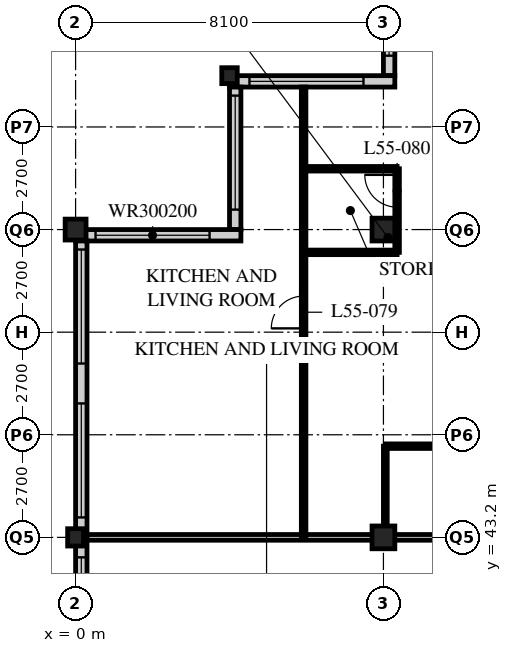
"""IFC4 building model, lengths in metres.
Left out: names, types, materials, properties, quantities, classifications, styles, units other than length and angle.
Written with IfcOpenShell. Run it as: python <this file> out.ifc"""

import sys

from ifc_helpers import new_model, si_unit, direction, frame, frame_2d, origin, origin_2d, place, context, subcontext, project, spatial, rectangle, hollow_rectangle, i_section, extrude, element, fill, save


model = new_model("IFC4")
c1 = context("Model", 3, precision=1e-05, world=origin(), true_north=direction((0.0, 1.0)))
c2 = subcontext(c1, "Body", "Model", "MODEL_VIEW")
j1 = project(units=[si_unit("LENGTHUNIT", "METRE"), si_unit("PLANEANGLEUNIT", "RADIAN")], contexts=[c1])
p1 = place(None, origin())
s1 = spatial("IfcSite", under=j1, at=p1, CompositionType="ELEMENT")
p2 = place(p1, origin())
s2 = spatial("IfcBuilding", under=s1, at=p2, CompositionType="ELEMENT")
p3 = place(p2, frame((0.0, 0.0, 213.6)))
s3 = spatial("IfcBuildingStorey", under=s2, at=p3, CompositionType="ELEMENT", Elevation=213.6)
p4 = place(p3, frame((0.0, 43.2, 0.0), z_axis=(0.0, 0.0, 1.0), x_axis=(1.0, 0.0, 0.0)))
e1 = element("IfcColumn", 1, at=p4, inside=s3, PredefinedType="COLUMN", context=c2, shape_type="SweptSolid", body=[
    extrude(i_section(OverallWidth=0.418, OverallDepth=0.456, WebThickness=0.042, FlangeThickness=0.067, FilletRadius=0.015, at=origin_2d()), origin(), (0.0, 0.0, 1.0), 3.6),
])
p5 = place(p3, frame((0.0, 51.3, 0.0), z_axis=(0.0, 0.0, 1.0), x_axis=(1.0, 0.0, 0.0)))
e2 = element("IfcColumn", 2, at=p5, inside=s3, PredefinedType="COLUMN", context=c2, shape_type="SweptSolid", body=[
    extrude(hollow_rectangle(XDim=0.55, YDim=0.55, WallThickness=0.045, at=origin_2d()), origin(), (0.0, 0.0, 1.0), 3.6),
])
p6 = place(p3, frame((4.05, 55.35, 0.0), z_axis=(0.0, 0.0, 1.0), x_axis=(1.0, 0.0, 0.0)))
e3 = element("IfcColumn", 3, at=p6, inside=s3, PredefinedType="COLUMN", context=c2, shape_type="SweptSolid", body=[
    extrude(i_section(OverallWidth=0.407, OverallDepth=0.419, WebThickness=0.031, FlangeThickness=0.049, FilletRadius=0.015, at=origin_2d()), origin(), (0.0, 0.0, 1.0), 3.6),
])
for number, where, z_axis, x_axis in (
    (4, (8.1, 43.2, 0.0), (0.0, 0.0, 1.0), (1.0, 0.0, 0.0)),
    (5, (8.1, 51.3, 0.0), (0.0, 0.0, 1.0), (1.0, 0.0, 0.0)),
):
    element("IfcColumn", number, at=place(p3, frame(where, z_axis=z_axis, x_axis=x_axis)), inside=s3, PredefinedType="COLUMN", context=c2, shape_type="SweptSolid", body=[
        extrude(hollow_rectangle(XDim=0.6, YDim=0.6, WallThickness=0.05, at=origin_2d()), origin(), (0.0, 0.0, 1.0), 3.6),
    ])
p7 = place(p3, frame((8.25, 59.1, 0.0), z_axis=(0.0, 0.0, 1.0), x_axis=(0.0, -1.0, 0.0)))
e6 = element("IfcWall", 6, at=p7, inside=s3, PredefinedType="SOLIDWALL", context=c2, shape_type="SweptSolid", body=[
    extrude(rectangle(XDim=3.75, YDim=0.3, at=frame_2d((1.875, 0.0))), origin(), (0.0, 0.0, 1.0), 3.39),
])
p8 = place(p7, frame((0.225, 0.0, 0.6)))
e7 = element("IfcOpeningElement", 7, at=p8, cuts=e6, PredefinedType="OPENING", context=c2, shape_type="SweptSolid", body=[
    extrude(rectangle(XDim=3.0, YDim=2.0, at=frame_2d((1.5, 1.0))), frame((0.0, 0.16, 0.0), z_axis=(0.0, -1.0, 0.0), x_axis=(1.0, 0.0, 0.0)), (0.0, 0.0, 1.0), 0.32),
])
p9 = place(p3, frame((8.4, 55.2, 0.0), z_axis=(0.0, 0.0, 1.0), x_axis=(-1.0, 0.0, 0.0)))
e8 = element("IfcWall", 8, at=p9, inside=s3, PredefinedType="SOLIDWALL", context=c2, shape_type="SweptSolid", body=[
    extrude(rectangle(XDim=4.35, YDim=0.3, at=frame_2d((2.175, 0.0))), origin(), (0.0, 0.0, 1.0), 3.39),
])
p10 = place(p9, frame((0.825, 0.0, 0.6)))
e9 = element("IfcOpeningElement", 9, at=p10, cuts=e8, PredefinedType="OPENING", context=c2, shape_type="SweptSolid", body=[
    extrude(rectangle(XDim=3.0, YDim=2.0, at=frame_2d((1.5, 1.0))), frame((0.0, 0.16, 0.0), z_axis=(0.0, -1.0, 0.0), x_axis=(1.0, 0.0, 0.0)), (0.0, 0.0, 1.0), 0.32),
])
p11 = place(p3, frame((4.2, 55.05, 0.0), z_axis=(0.0, 0.0, 1.0), x_axis=(0.0, -1.0, 0.0)))
e10 = element("IfcWall", 10, at=p11, inside=s3, PredefinedType="SOLIDWALL", context=c2, shape_type="SweptSolid", body=[
    extrude(rectangle(XDim=3.75, YDim=0.3, at=frame_2d((1.875, 0.0))), origin(), (0.0, 0.0, 1.0), 3.39),
])
p12 = place(p11, frame((0.225, 0.0, 0.6)))
e11 = element("IfcOpeningElement", 11, at=p12, cuts=e10, PredefinedType="OPENING", context=c2, shape_type="SweptSolid", body=[
    extrude(rectangle(XDim=3.0, YDim=2.0, at=frame_2d((1.5, 1.0))), frame((0.0, 0.16, 0.0), z_axis=(0.0, -1.0, 0.0), x_axis=(1.0, 0.0, 0.0)), (0.0, 0.0, 1.0), 0.32),
])
p13 = place(p3, frame((4.35, 51.15, 0.0), z_axis=(0.0, 0.0, 1.0), x_axis=(-1.0, 0.0, 0.0)))
e12 = element("IfcWall", 12, at=p13, inside=s3, PredefinedType="SOLIDWALL", context=c2, shape_type="SweptSolid", body=[
    extrude(rectangle(XDim=4.35, YDim=0.3, at=frame_2d((2.175, 0.0))), origin(), (0.0, 0.0, 1.0), 3.39),
])
p14 = place(p13, frame((0.825, 0.0, 0.6)))
e13 = element("IfcOpeningElement", 13, at=p14, cuts=e12, PredefinedType="OPENING", context=c2, shape_type="SweptSolid", body=[
    extrude(rectangle(XDim=3.0, YDim=2.0, at=frame_2d((1.5, 1.0))), frame((0.0, 0.16, 0.0), z_axis=(0.0, -1.0, 0.0), x_axis=(1.0, 0.0, 0.0)), (0.0, 0.0, 1.0), 0.32),
])
p15 = place(p3, frame((0.15, 51.0, 0.0), z_axis=(0.0, 0.0, 1.0), x_axis=(0.0, -1.0, 0.0)))
e14 = element("IfcWall", 14, at=p15, inside=s3, PredefinedType="SOLIDWALL", context=c2, shape_type="SweptSolid", body=[
    extrude(rectangle(XDim=32.1, YDim=0.3, at=frame_2d((16.05, 0.0))), origin(), (0.0, 0.0, 1.0), 3.39),
])
p16 = place(p15, frame((0.225, 0.0, 0.6)))
e15 = element("IfcOpeningElement", 15, at=p16, cuts=e14, PredefinedType="OPENING", context=c2, shape_type="SweptSolid", body=[
    extrude(rectangle(XDim=3.0, YDim=2.4, at=frame_2d((1.5, 1.2))), frame((0.0, 0.16, 0.0), z_axis=(0.0, -1.0, 0.0), x_axis=(1.0, 0.0, 0.0)), (0.0, 0.0, 1.0), 0.32),
])
p17 = place(p15, frame((4.275, 0.0, 0.6)))
e16 = element("IfcOpeningElement", 16, at=p17, cuts=e14, PredefinedType="OPENING", context=c2, shape_type="SweptSolid", body=[
    extrude(rectangle(XDim=3.0, YDim=2.4, at=frame_2d((1.5, 1.2))), frame((0.0, 0.16, 0.0), z_axis=(0.0, -1.0, 0.0), x_axis=(1.0, 0.0, 0.0)), (0.0, 0.0, 1.0), 0.32),
])
p18 = place(p15, frame((8.325, 0.0, 0.6)))
e17 = element("IfcOpeningElement", 17, at=p18, cuts=e14, PredefinedType="OPENING", context=c2, shape_type="SweptSolid", body=[
    extrude(rectangle(XDim=3.0, YDim=2.4, at=frame_2d((1.5, 1.2))), frame((0.0, 0.16, 0.0), z_axis=(0.0, -1.0, 0.0), x_axis=(1.0, 0.0, 0.0)), (0.0, 0.0, 1.0), 0.32),
])
p19 = place(p15, frame((12.375, 0.0, 0.6)))
e18 = element("IfcOpeningElement", 18, at=p19, cuts=e14, PredefinedType="OPENING", context=c2, shape_type="SweptSolid", body=[
    extrude(rectangle(XDim=3.0, YDim=2.4, at=frame_2d((1.5, 1.2))), frame((0.0, 0.16, 0.0), z_axis=(0.0, -1.0, 0.0), x_axis=(1.0, 0.0, 0.0)), (0.0, 0.0, 1.0), 0.32),
])
p20 = place(p15, frame((16.425, 0.0, 0.6)))
e19 = element("IfcOpeningElement", 19, at=p20, cuts=e14, PredefinedType="OPENING", context=c2, shape_type="SweptSolid", body=[
    extrude(rectangle(XDim=3.0, YDim=2.4, at=frame_2d((1.5, 1.2))), frame((0.0, 0.16, 0.0), z_axis=(0.0, -1.0, 0.0), x_axis=(1.0, 0.0, 0.0)), (0.0, 0.0, 1.0), 0.32),
])
p21 = place(p15, frame((20.475, 0.0, 0.6)))
e20 = element("IfcOpeningElement", 20, at=p21, cuts=e14, PredefinedType="OPENING", context=c2, shape_type="SweptSolid", body=[
    extrude(rectangle(XDim=3.0, YDim=2.4, at=frame_2d((1.5, 1.2))), frame((0.0, 0.16, 0.0), z_axis=(0.0, -1.0, 0.0), x_axis=(1.0, 0.0, 0.0)), (0.0, 0.0, 1.0), 0.32),
])
p22 = place(p15, frame((24.525, 0.0, 0.6)))
e21 = element("IfcOpeningElement", 21, at=p22, cuts=e14, PredefinedType="OPENING", context=c2, shape_type="SweptSolid", body=[
    extrude(rectangle(XDim=3.0, YDim=2.4, at=frame_2d((1.5, 1.2))), frame((0.0, 0.16, 0.0), z_axis=(0.0, -1.0, 0.0), x_axis=(1.0, 0.0, 0.0)), (0.0, 0.0, 1.0), 0.32),
])
p23 = place(p15, frame((28.575, 0.0, 0.6)))
e22 = element("IfcOpeningElement", 22, at=p23, cuts=e14, PredefinedType="OPENING", context=c2, shape_type="SweptSolid", body=[
    extrude(rectangle(XDim=3.0, YDim=2.4, at=frame_2d((1.5, 1.2))), frame((0.0, 0.16, 0.0), z_axis=(0.0, -1.0, 0.0), x_axis=(1.0, 0.0, 0.0)), (0.0, 0.0, 1.0), 0.32),
])
p24 = place(p3, frame((8.15, 43.2, 0.0), z_axis=(0.0, 0.0, 1.0), x_axis=(0.0, 1.0, 0.0)))
e23 = element("IfcWall", 23, at=p24, inside=s3, PredefinedType="PARTITIONING", context=c2, shape_type="SweptSolid", body=[
    extrude(rectangle(XDim=2.4, YDim=0.1, at=frame_2d((1.2, 0.0))), origin(), (0.0, 0.0, 1.0), 2.778),
])
p25 = place(p3, frame((8.15, 45.6, 0.0), z_axis=(0.0, 0.0, 1.0), x_axis=(1.0, 0.0, 0.0)))
e24 = element("IfcWall", 24, at=p25, inside=s3, PredefinedType="PARTITIONING", context=c2, shape_type="SweptSolid", body=[
    extrude(rectangle(XDim=28.3, YDim=0.12, at=frame_2d((14.15, 0.0))), origin(), (0.0, 0.0, 1.0), 3.39),
])
p26 = place(p25, frame((9.025, 0.0, 0.0)))
e25 = element("IfcOpeningElement", 25, at=p26, cuts=e24, PredefinedType="OPENING", context=c2, shape_type="SweptSolid", body=[
    extrude(rectangle(XDim=0.85, YDim=2.1, at=frame_2d((0.425, 1.05))), frame((0.0, 0.07, 0.0), z_axis=(0.0, -1.0, 0.0), x_axis=(1.0, 0.0, 0.0)), (0.0, 0.0, 1.0), 0.14),
])
p27 = place(p25, frame((16.475, 0.0, 0.0)))
e26 = element("IfcOpeningElement", 26, at=p27, cuts=e24, PredefinedType="OPENING", context=c2, shape_type="SweptSolid", body=[
    extrude(rectangle(XDim=0.85, YDim=2.1, at=frame_2d((0.425, 1.05))), frame((0.0, 0.07, 0.0), z_axis=(0.0, -1.0, 0.0), x_axis=(1.0, 0.0, 0.0)), (0.0, 0.0, 1.0), 0.14),
])
p28 = place(p25, frame((20.525, 0.0, 0.0)))
e27 = element("IfcOpeningElement", 27, at=p28, cuts=e24, PredefinedType="OPENING", context=c2, shape_type="SweptSolid", body=[
    extrude(rectangle(XDim=0.85, YDim=2.1, at=frame_2d((0.425, 1.05))), frame((0.0, 0.07, 0.0), z_axis=(0.0, -1.0, 0.0), x_axis=(1.0, 0.0, 0.0)), (0.0, 0.0, 1.0), 0.14),
])
p29 = place(p25, frame((24.575, 0.0, 0.0)))
e28 = element("IfcOpeningElement", 28, at=p29, cuts=e24, PredefinedType="OPENING", context=c2, shape_type="SweptSolid", body=[
    extrude(rectangle(XDim=0.85, YDim=2.1, at=frame_2d((0.425, 1.05))), frame((0.0, 0.07, 0.0), z_axis=(0.0, -1.0, 0.0), x_axis=(1.0, 0.0, 0.0)), (0.0, 0.0, 1.0), 0.14),
])
p30 = place(p25, frame((6.725, 0.0, 0.0)))
e29 = element("IfcOpeningElement", 29, at=p30, cuts=e24, PredefinedType="OPENING", context=c2, shape_type="SweptSolid", body=[
    extrude(rectangle(XDim=0.85, YDim=2.1, at=frame_2d((0.425, 1.05))), frame((0.0, 0.07, 0.0), z_axis=(0.0, -1.0, 0.0), x_axis=(1.0, 0.0, 0.0)), (0.0, 0.0, 1.0), 0.14),
])
p31 = place(p25, frame((2.875, 0.0, 0.0)))
e30 = element("IfcOpeningElement", 30, at=p31, cuts=e24, PredefinedType="OPENING", context=c2, shape_type="SweptSolid", body=[
    extrude(rectangle(XDim=0.85, YDim=2.1, at=frame_2d((0.425, 1.05))), frame((0.0, 0.07, 0.0), z_axis=(0.0, -1.0, 0.0), x_axis=(1.0, 0.0, 0.0)), (0.0, 0.0, 1.0), 0.14),
])
p32 = place(p3, frame((0.3, 43.2, 0.0), z_axis=(0.0, 0.0, 1.0), x_axis=(1.0, 0.0, 0.0)))
e31 = element("IfcWall", 31, at=p32, inside=s3, PredefinedType="PARTITIONING", context=c2, shape_type="SweptSolid", body=[
    extrude(rectangle(XDim=11.85, YDim=0.15, at=frame_2d((5.925, 0.0))), origin(), (0.0, 0.0, 1.0), 2.778),
])
p33 = place(p3, frame((6.0, 43.2, 0.0), z_axis=(0.0, 0.0, 1.0), x_axis=(0.0, 1.0, 0.0)))
e32 = element("IfcWall", 32, at=p33, inside=s3, PredefinedType="PARTITIONING", context=c2, shape_type="SweptSolid", body=[
    extrude(rectangle(XDim=11.85, YDim=0.12, at=frame_2d((5.925, 0.0))), origin(), (0.0, 0.0, 1.0), 3.39),
])
p34 = place(p33, frame((5.5, 0.0, 0.0)))
e33 = element("IfcOpeningElement", 33, at=p34, cuts=e32, PredefinedType="OPENING", context=c2, shape_type="SweptSolid", body=[
    extrude(rectangle(XDim=0.85, YDim=2.1, at=frame_2d((0.425, 1.05))), frame((0.0, 0.07, 0.0), z_axis=(0.0, -1.0, 0.0), x_axis=(1.0, 0.0, 0.0)), (0.0, 0.0, 1.0), 0.14),
])
for number, where, z_axis, x_axis in (
    (34, (6.0, 50.7, 0.0), (0.0, 0.0, 1.0), (1.0, 0.0, 0.0)),
    (35, (6.0, 52.9, 0.0), (0.0, 0.0, 1.0), (1.0, 0.0, 0.0)),
):
    element("IfcWall", number, at=place(p3, frame(where, z_axis=z_axis, x_axis=x_axis)), inside=s3, PredefinedType="PARTITIONING", context=c2, shape_type="SweptSolid", body=[
        extrude(rectangle(XDim=2.46, YDim=0.12, at=frame_2d((1.23, 0.0))), origin(), (0.0, 0.0, 1.0), 3.39),
    ])
p35 = place(p3, frame((8.46, 50.7, 0.0), z_axis=(0.0, 0.0, 1.0), x_axis=(0.0, 1.0, 0.0)))
e36 = element("IfcWall", 36, at=p35, inside=s3, PredefinedType="PARTITIONING", context=c2, shape_type="SweptSolid", body=[
    extrude(rectangle(XDim=2.2, YDim=0.12, at=frame_2d((1.1, 0.0))), origin(), (0.0, 0.0, 1.0), 3.39),
])
p36 = place(p35, frame((1.19, 0.0, 0.0)))
e37 = element("IfcOpeningElement", 37, at=p36, cuts=e36, PredefinedType="OPENING", context=c2, shape_type="SweptSolid", body=[
    extrude(rectangle(XDim=0.85, YDim=2.1, at=frame_2d((0.425, 1.05))), frame((0.0, 0.07, 0.0), z_axis=(0.0, -1.0, 0.0), x_axis=(1.0, 0.0, 0.0)), (0.0, 0.0, 1.0), 0.14),
])
p37 = place(p8, origin())
e38 = element("IfcWindow", 38, at=p37, inside=s3, PartitioningType="SINGLE_PANEL", PredefinedType="WINDOW", context=c2, shape_type="SweptSolid", body=[
    extrude(rectangle(XDim=3.0, YDim=2.0, at=frame_2d((1.5, 1.0))), frame((0.0, 0.03, 0.0), z_axis=(0.0, -1.0, 0.0), x_axis=(1.0, 0.0, 0.0)), (0.0, 0.0, 1.0), 0.06),
])
fill(e7, e38)
p38 = place(p10, origin())
e39 = element("IfcWindow", 39, at=p38, inside=s3, PartitioningType="SINGLE_PANEL", PredefinedType="WINDOW", context=c2, shape_type="SweptSolid", body=[
    extrude(rectangle(XDim=3.0, YDim=2.0, at=frame_2d((1.5, 1.0))), frame((0.0, 0.03, 0.0), z_axis=(0.0, -1.0, 0.0), x_axis=(1.0, 0.0, 0.0)), (0.0, 0.0, 1.0), 0.06),
])
fill(e9, e39)
p39 = place(p12, origin())
e40 = element("IfcWindow", 40, at=p39, inside=s3, PartitioningType="SINGLE_PANEL", PredefinedType="WINDOW", context=c2, shape_type="SweptSolid", body=[
    extrude(rectangle(XDim=3.0, YDim=2.0, at=frame_2d((1.5, 1.0))), frame((0.0, 0.03, 0.0), z_axis=(0.0, -1.0, 0.0), x_axis=(1.0, 0.0, 0.0)), (0.0, 0.0, 1.0), 0.06),
])
fill(e11, e40)
p40 = place(p14, origin())
e41 = element("IfcWindow", 41, at=p40, inside=s3, PartitioningType="SINGLE_PANEL", PredefinedType="WINDOW", context=c2, shape_type="SweptSolid", body=[
    extrude(rectangle(XDim=3.0, YDim=2.0, at=frame_2d((1.5, 1.0))), frame((0.0, 0.03, 0.0), z_axis=(0.0, -1.0, 0.0), x_axis=(1.0, 0.0, 0.0)), (0.0, 0.0, 1.0), 0.06),
])
fill(e13, e41)
p41 = place(p16, origin())
e42 = element("IfcWindow", 42, at=p41, inside=s3, PartitioningType="SINGLE_PANEL", PredefinedType="WINDOW", context=c2, shape_type="SweptSolid", body=[
    extrude(rectangle(XDim=3.0, YDim=2.4, at=frame_2d((1.5, 1.2))), frame((0.0, 0.03, 0.0), z_axis=(0.0, -1.0, 0.0), x_axis=(1.0, 0.0, 0.0)), (0.0, 0.0, 1.0), 0.06),
])
fill(e15, e42)
p42 = place(p17, origin())
e43 = element("IfcWindow", 43, at=p42, inside=s3, PartitioningType="SINGLE_PANEL", PredefinedType="WINDOW", context=c2, shape_type="SweptSolid", body=[
    extrude(rectangle(XDim=3.0, YDim=2.4, at=frame_2d((1.5, 1.2))), frame((0.0, 0.03, 0.0), z_axis=(0.0, -1.0, 0.0), x_axis=(1.0, 0.0, 0.0)), (0.0, 0.0, 1.0), 0.06),
])
fill(e16, e43)
p43 = place(p18, origin())
e44 = element("IfcWindow", 44, at=p43, inside=s3, PartitioningType="SINGLE_PANEL", PredefinedType="WINDOW", context=c2, shape_type="SweptSolid", body=[
    extrude(rectangle(XDim=3.0, YDim=2.4, at=frame_2d((1.5, 1.2))), frame((0.0, 0.03, 0.0), z_axis=(0.0, -1.0, 0.0), x_axis=(1.0, 0.0, 0.0)), (0.0, 0.0, 1.0), 0.06),
])
fill(e17, e44)
p44 = place(p34, origin())
e45 = element("IfcDoor", 45, at=p44, inside=s3, OperationType="SINGLE_SWING_LEFT", PredefinedType="DOOR", context=c2, shape_type="SweptSolid", body=[
    extrude(rectangle(XDim=0.85, YDim=2.1, at=frame_2d((0.425, 1.05))), frame((0.0, 0.025, 0.0), z_axis=(0.0, -1.0, 0.0), x_axis=(1.0, 0.0, 0.0)), (0.0, 0.0, 1.0), 0.05),
])
fill(e33, e45)
p45 = place(p36, origin())
e46 = element("IfcDoor", 46, at=p45, inside=s3, OperationType="SINGLE_SWING_RIGHT", PredefinedType="DOOR", context=c2, shape_type="SweptSolid", body=[
    extrude(rectangle(XDim=0.85, YDim=2.1, at=frame_2d((0.425, 1.05))), frame((0.0, 0.025, 0.0), z_axis=(0.0, -1.0, 0.0), x_axis=(1.0, 0.0, 0.0)), (0.0, 0.0, 1.0), 0.05),
])
fill(e37, e46)
save(model, sys.argv[1])
